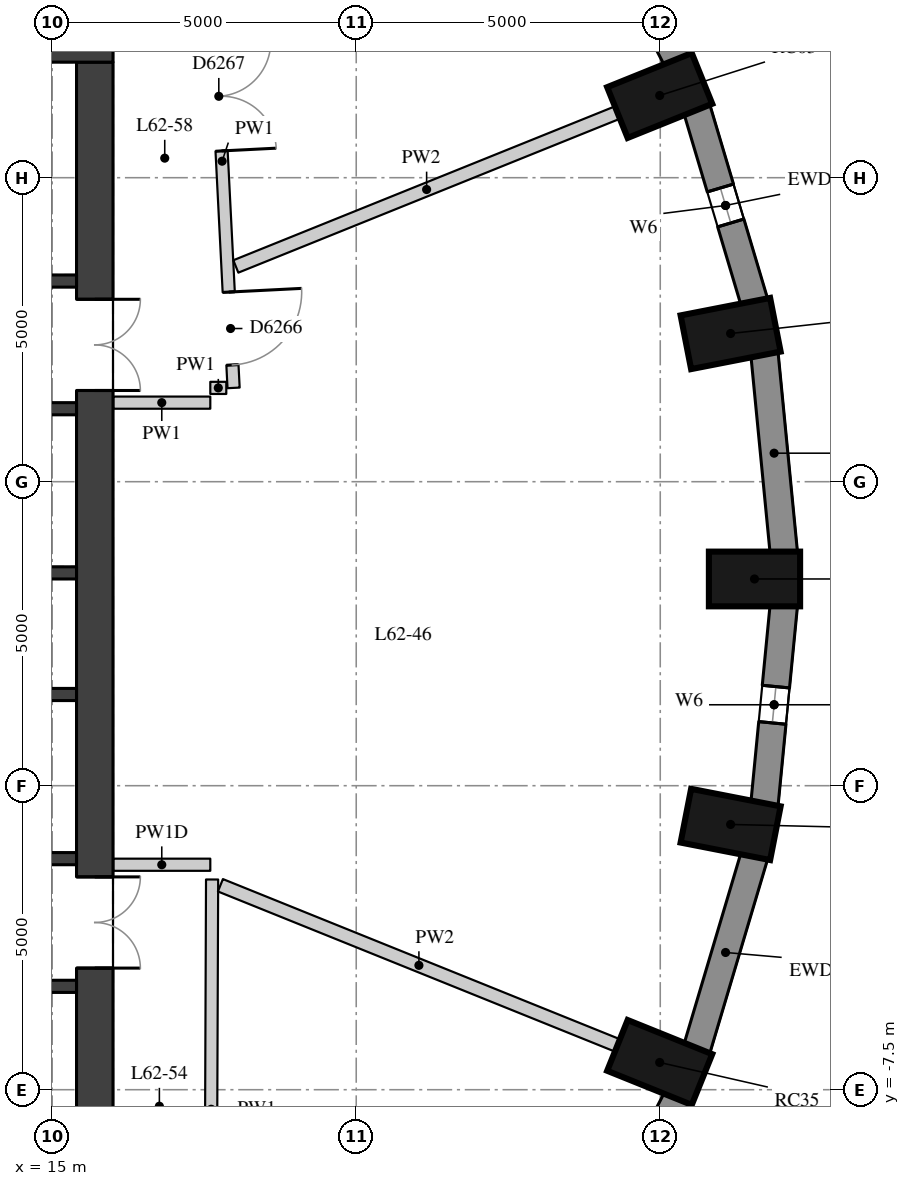
"""IFC4 building model, lengths in metres.
Left out: names, types, materials, properties, quantities, classifications, styles, units other than length and angle.
Written with IfcOpenShell. Run it as: python <this file> out.ifc"""

import sys

from ifc_helpers import new_model, si_unit, direction, frame, frame_2d, origin, origin_2d, place, context, subcontext, project, spatial, rectangle, extrude, element, fill, save


model = new_model("IFC4")
c1 = context("Model", 3, precision=1e-05, world=origin(), true_north=direction((0.0, 1.0)))
c2 = subcontext(c1, "Body", "Model", "MODEL_VIEW")
j1 = project(units=[si_unit("LENGTHUNIT", "METRE"), si_unit("PLANEANGLEUNIT", "RADIAN")], contexts=[c1])
p1 = place(None, origin())
s1 = spatial("IfcSite", under=j1, at=p1, CompositionType="ELEMENT")
p2 = place(p1, origin())
s2 = spatial("IfcBuilding", under=s1, at=p2, CompositionType="ELEMENT")
p3 = place(p2, frame((0.0, 0.0, 218.9)))
s3 = spatial("IfcBuildingStorey", under=s2, at=p3, CompositionType="ELEMENT", Elevation=218.9)
for number, where, z_axis, x_axis in (
    (1, (26.55, 0.9, 0.0), (0.0, 0.0, 1.0), (1.0, 0.0, 0.0)),
    (2, (26.157, 4.937, 0.0), (0.0, 0.0, 1.0), (0.981, 0.192, 0.0)),
    (3, (24.991, 8.852, 0.0), (0.0, 0.0, 1.0), (0.927, 0.374, 0.0)),
    (4, (24.991, -7.052, 0.0), (0.0, 0.0, 1.0), (0.927, -0.374, 0.0)),
    (5, (26.157, -3.137, 0.0), (0.0, 0.0, 1.0), (0.981, -0.192, 0.0)),
):
    element("IfcColumn", number, at=place(p3, frame(where, z_axis=z_axis, x_axis=x_axis)), inside=s3, PredefinedType="COLUMN", context=c2, shape_type="SweptSolid", body=[
        extrude(rectangle(XDim=1.5, YDim=0.9, at=origin_2d()), origin(), (0.0, 0.0, 1.0), 3.3),
    ])
p4 = place(p3, frame((27.032, 1.33, 0.0), z_axis=(0.0, 0.0, 1.0), x_axis=(-0.096824116835, 0.995301507283, 0.0)))
e6 = element("IfcWall", 6, at=p4, inside=s3, PredefinedType="SOLIDWALL", context=c2, shape_type="SweptSolid", body=[
    extrude(rectangle(XDim=3.293, YDim=0.45, at=frame_2d((1.646, 0.0))), origin(), (0.0, 0.0, 1.0), 3.02),
])
p5 = place(p3, frame((26.548, 5.452, 0.0), z_axis=(0.0, 0.0, 1.0), x_axis=(-0.285444972963, 0.958395099847, 0.0)))
e7 = element("IfcWall", 7, at=p5, inside=s3, PredefinedType="SOLIDWALL", context=c2, shape_type="SweptSolid", body=[
    extrude(rectangle(XDim=3.32, YDim=0.45, at=frame_2d((1.66, 0.0))), origin(), (0.0, 0.0, 1.0), 3.02),
])
p6 = place(p5, frame((1.36, 0.0, 0.4)))
e8 = element("IfcOpeningElement", 8, at=p6, cuts=e7, PredefinedType="OPENING", context=c2, shape_type="SweptSolid", body=[
    extrude(rectangle(XDim=0.6, YDim=1.75, at=frame_2d((0.3, 0.875))), frame((0.0, 0.235, 0.0), z_axis=(0.0, -1.0, 0.0), x_axis=(1.0, 0.0, 0.0)), (0.0, 0.0, 1.0), 0.47),
])
p7 = place(p3, frame((25.278, 9.432, 0.0), z_axis=(0.0, 0.0, 1.0), x_axis=(-0.460175500475, 0.887827972505, 0.0)))
e9 = element("IfcWall", 9, at=p7, inside=s3, PredefinedType="SOLIDWALL", context=c2, shape_type="SweptSolid", body=[
    extrude(rectangle(XDim=3.371, YDim=0.45, at=frame_2d((1.685, 0.0))), origin(), (0.0, 0.0, 1.0), 3.02),
])
p8 = place(p3, frame((23.727, -10.624, 0.0), z_axis=(0.0, 0.0, 1.0), x_axis=(0.460175500475, 0.887827972505, 0.0)))
e10 = element("IfcWall", 10, at=p8, inside=s3, PredefinedType="SOLIDWALL", context=c2, shape_type="SweptSolid", body=[
    extrude(rectangle(XDim=3.371, YDim=0.45, at=frame_2d((1.685, 0.0))), origin(), (0.0, 0.0, 1.0), 3.02),
])
p9 = place(p8, frame((1.385, 0.0, 0.4)))
e11 = element("IfcOpeningElement", 11, at=p9, cuts=e10, PredefinedType="OPENING", context=c2, shape_type="SweptSolid", body=[
    extrude(rectangle(XDim=0.6, YDim=1.75, at=frame_2d((0.3, 0.875))), frame((0.0, 0.235, 0.0), z_axis=(0.0, -1.0, 0.0), x_axis=(1.0, 0.0, 0.0)), (0.0, 0.0, 1.0), 0.47),
])
p10 = place(p3, frame((25.6, -6.834, 0.0), z_axis=(0.0, 0.0, 1.0), x_axis=(0.285444972963, 0.958395099847, 0.0)))
e12 = element("IfcWall", 12, at=p10, inside=s3, PredefinedType="SOLIDWALL", context=c2, shape_type="SweptSolid", body=[
    extrude(rectangle(XDim=3.32, YDim=0.45, at=frame_2d((1.66, 0.0))), origin(), (0.0, 0.0, 1.0), 3.02),
])
p11 = place(p3, frame((26.713, -2.808, 0.0), z_axis=(0.0, 0.0, 1.0), x_axis=(0.096816972749, 0.995302202242, 0.0)))
e13 = element("IfcWall", 13, at=p11, inside=s3, PredefinedType="SOLIDWALL", context=c2, shape_type="SweptSolid", body=[
    extrude(rectangle(XDim=3.293, YDim=0.45, at=frame_2d((1.646, 0.0))), origin(), (0.0, 0.0, 1.0), 3.02),
])
p12 = place(p11, frame((1.347, 0.0, 0.4)))
e14 = element("IfcOpeningElement", 14, at=p12, cuts=e13, PredefinedType="OPENING", context=c2, shape_type="SweptSolid", body=[
    extrude(rectangle(XDim=0.6, YDim=1.75, at=frame_2d((0.3, 0.875))), frame((0.0, 0.235, 0.0), z_axis=(0.0, -1.0, 0.0), x_axis=(1.0, 0.0, 0.0)), (0.0, 0.0, 1.0), 0.47),
])
p13 = place(p3, frame((15.7, -9.4, 0.0), z_axis=(0.0, 0.0, 1.0), x_axis=(0.0, 1.0, 0.0)))
e15 = element("IfcWall", 15, at=p13, inside=s3, PredefinedType="SHEAR", context=c2, shape_type="SweptSolid", body=[
    extrude(rectangle(XDim=18.8, YDim=0.6, at=frame_2d((9.4, 0.0))), origin(), (0.0, 0.0, 1.0), 3.02),
])
p14 = place(p13, frame((13.4, 0.0, 0.0)))
e16 = element("IfcOpeningElement", 16, at=p14, cuts=e15, PredefinedType="OPENING", context=c2, shape_type="SweptSolid", body=[
    extrude(rectangle(XDim=1.5, YDim=2.1, at=frame_2d((0.75, 1.05))), frame((0.0, 0.31, 0.0), z_axis=(0.0, -1.0, 0.0), x_axis=(1.0, 0.0, 0.0)), (0.0, 0.0, 1.0), 0.62),
])
p15 = place(p13, frame((3.9, 0.0, 0.0)))
e17 = element("IfcOpeningElement", 17, at=p15, cuts=e15, PredefinedType="OPENING", context=c2, shape_type="SweptSolid", body=[
    extrude(rectangle(XDim=1.5, YDim=2.1, at=frame_2d((0.75, 1.05))), frame((0.0, 0.31, 0.0), z_axis=(0.0, -1.0, 0.0), x_axis=(1.0, 0.0, 0.0)), (0.0, 0.0, 1.0), 0.62),
])
p16 = place(p3, frame((4.0, 9.7, 0.0), z_axis=(0.0, 0.0, 1.0), x_axis=(1.0, 0.0, 0.0)))
e18 = element("IfcWall", 18, at=p16, inside=s3, PredefinedType="SHEAR", context=c2, shape_type="SweptSolid", body=[
    extrude(rectangle(XDim=12.0, YDim=0.6, at=frame_2d((6.0, 0.0))), origin(), (0.0, 0.0, 1.0), 3.02),
])
p17 = place(p3, frame((4.6, 5.8, 0.0), z_axis=(0.0, 0.0, 1.0), x_axis=(1.0, 0.0, 0.0)))
e19 = element("IfcWall", 19, at=p17, inside=s3, PredefinedType="SHEAR", context=c2, shape_type="SweptSolid", body=[
    extrude(rectangle(XDim=10.8, YDim=0.2, at=frame_2d((5.4, 0.0))), origin(), (0.0, 0.0, 1.0), 3.02),
])
p18 = place(p17, frame((7.05, 0.0, 0.0)))
e20 = element("IfcOpeningElement", 20, at=p18, cuts=e19, PredefinedType="OPENING", context=c2, shape_type="SweptSolid", body=[
    extrude(rectangle(XDim=1.1, YDim=2.1, at=frame_2d((0.55, 1.05))), frame((0.0, 0.11, 0.0), z_axis=(0.0, -1.0, 0.0), x_axis=(1.0, 0.0, 0.0)), (0.0, 0.0, 1.0), 0.22),
])
p19 = place(p17, frame((9.05, 0.0, 0.0)))
e21 = element("IfcOpeningElement", 21, at=p19, cuts=e19, PredefinedType="OPENING", context=c2, shape_type="SweptSolid", body=[
    extrude(rectangle(XDim=1.1, YDim=2.1, at=frame_2d((0.55, 1.05))), frame((0.0, 0.11, 0.0), z_axis=(0.0, -1.0, 0.0), x_axis=(1.0, 0.0, 0.0)), (0.0, 0.0, 1.0), 0.22),
])
p20 = place(p3, frame((4.6, 3.7, 0.0), z_axis=(0.0, 0.0, 1.0), x_axis=(1.0, 0.0, 0.0)))
e22 = element("IfcWall", 22, at=p20, inside=s3, PredefinedType="SHEAR", context=c2, shape_type="SweptSolid", body=[
    extrude(rectangle(XDim=10.8, YDim=0.2, at=frame_2d((5.4, 0.0))), origin(), (0.0, 0.0, 1.0), 3.02),
])
p21 = place(p20, frame((6.6, 0.0, 0.0)))
e23 = element("IfcOpeningElement", 23, at=p21, cuts=e22, PredefinedType="OPENING", context=c2, shape_type="SweptSolid", body=[
    extrude(rectangle(XDim=1.1, YDim=2.1, at=frame_2d((0.55, 1.05))), frame((0.0, 0.11, 0.0), z_axis=(0.0, -1.0, 0.0), x_axis=(1.0, 0.0, 0.0)), (0.0, 0.0, 1.0), 0.22),
])
p22 = place(p20, frame((8.9, 0.0, 0.0)))
e24 = element("IfcOpeningElement", 24, at=p22, cuts=e22, PredefinedType="OPENING", context=c2, shape_type="SweptSolid", body=[
    extrude(rectangle(XDim=1.1, YDim=2.1, at=frame_2d((0.55, 1.05))), frame((0.0, 0.11, 0.0), z_axis=(0.0, -1.0, 0.0), x_axis=(1.0, 0.0, 0.0)), (0.0, 0.0, 1.0), 0.22),
])
for number, where, z_axis, x_axis in (
    (25, (4.6, 1.0, 0.0), (0.0, 0.0, 1.0), (1.0, 0.0, 0.0)),
    (26, (4.6, -1.0, 0.0), (0.0, 0.0, 1.0), (1.0, 0.0, 0.0)),
):
    element("IfcWall", number, at=place(p3, frame(where, z_axis=z_axis, x_axis=x_axis)), inside=s3, PredefinedType="SHEAR", context=c2, shape_type="SweptSolid", body=[
        extrude(rectangle(XDim=10.8, YDim=0.2, at=frame_2d((5.4, 0.0))), origin(), (0.0, 0.0, 1.0), 3.02),
    ])
p23 = place(p3, frame((4.6, -3.7, 0.0), z_axis=(0.0, 0.0, 1.0), x_axis=(1.0, 0.0, 0.0)))
e27 = element("IfcWall", 27, at=p23, inside=s3, PredefinedType="SHEAR", context=c2, shape_type="SweptSolid", body=[
    extrude(rectangle(XDim=10.8, YDim=0.2, at=frame_2d((5.4, 0.0))), origin(), (0.0, 0.0, 1.0), 3.02),
])
p24 = place(p23, frame((6.6, 0.0, 0.0)))
e28 = element("IfcOpeningElement", 28, at=p24, cuts=e27, PredefinedType="OPENING", context=c2, shape_type="SweptSolid", body=[
    extrude(rectangle(XDim=1.1, YDim=2.1, at=frame_2d((0.55, 1.05))), frame((0.0, 0.11, 0.0), z_axis=(0.0, -1.0, 0.0), x_axis=(1.0, 0.0, 0.0)), (0.0, 0.0, 1.0), 0.22),
])
p25 = place(p23, frame((8.9, 0.0, 0.0)))
e29 = element("IfcOpeningElement", 29, at=p25, cuts=e27, PredefinedType="OPENING", context=c2, shape_type="SweptSolid", body=[
    extrude(rectangle(XDim=1.1, YDim=2.1, at=frame_2d((0.55, 1.05))), frame((0.0, 0.11, 0.0), z_axis=(0.0, -1.0, 0.0), x_axis=(1.0, 0.0, 0.0)), (0.0, 0.0, 1.0), 0.22),
])
p26 = place(p3, frame((4.6, -5.8, 0.0), z_axis=(0.0, 0.0, 1.0), x_axis=(1.0, 0.0, 0.0)))
e30 = element("IfcWall", 30, at=p26, inside=s3, PredefinedType="SHEAR", context=c2, shape_type="SweptSolid", body=[
    extrude(rectangle(XDim=10.8, YDim=0.2, at=frame_2d((5.4, 0.0))), origin(), (0.0, 0.0, 1.0), 3.02),
])
p27 = place(p3, frame((17.63, -4.043, 0.0), z_axis=(0.0, 0.0, 1.0), x_axis=(-0.003908870153, -0.999992360338, 0.0)))
e31 = element("IfcWall", 31, at=p27, inside=s3, PredefinedType="PARTITIONING", context=c2, shape_type="SweptSolid", body=[
    extrude(rectangle(XDim=7.557, YDim=0.2, at=frame_2d((3.779, 0.0))), origin(), (0.0, 0.0, 1.0), 3.02),
])
p28 = place(p3, frame((17.605, 11.5, 0.0), z_axis=(0.0, 0.0, 1.0), x_axis=(0.050646981223, -0.998716618112, 0.0)))
e32 = element("IfcWall", 32, at=p28, inside=s3, PredefinedType="PARTITIONING", context=c2, shape_type="SweptSolid", body=[
    extrude(rectangle(XDim=7.467, YDim=0.2, at=frame_2d((3.733, 0.0))), origin(), (0.0, 0.0, 1.0), 3.02),
])
p29 = place(p28, frame((5.889, 0.0, 0.0)))
e33 = element("IfcOpeningElement", 33, at=p29, cuts=e32, PredefinedType="OPENING", context=c2, shape_type="SweptSolid", body=[
    extrude(rectangle(XDim=1.2, YDim=2.1, at=frame_2d((0.6, 1.05))), frame((0.0, 0.11, 0.0), z_axis=(0.0, -1.0, 0.0), x_axis=(1.0, 0.0, 0.0)), (0.0, 0.0, 1.0), 0.22),
])
p30 = place(p28, frame((1.765, 0.0, 0.0)))
e34 = element("IfcOpeningElement", 34, at=p30, cuts=e32, PredefinedType="OPENING", context=c2, shape_type="SweptSolid", body=[
    extrude(rectangle(XDim=1.8, YDim=2.1, at=frame_2d((0.9, 1.05))), frame((0.0, 0.11, 0.0), z_axis=(0.0, -1.0, 0.0), x_axis=(1.0, 0.0, 0.0)), (0.0, 0.0, 1.0), 0.22),
])
p31 = place(p3, frame((17.863, 4.043, 0.0), z_axis=(0.0, 0.0, 1.0), x_axis=(-1.0, 0.0, 0.0)))
e35 = element("IfcWall", 35, at=p31, inside=s3, PredefinedType="PARTITIONING", context=c2, shape_type="SweptSolid", body=[
    extrude(rectangle(XDim=0.263, YDim=0.2, at=frame_2d((0.131, 0.0))), origin(), (0.0, 0.0, 1.0), 3.02),
])
p32 = place(p3, frame((17.6, 3.8, 0.0), z_axis=(0.0, 0.0, 1.0), x_axis=(-1.0, 0.0, 0.0)))
e36 = element("IfcWall", 36, at=p32, inside=s3, PredefinedType="PARTITIONING", context=c2, shape_type="SweptSolid", body=[
    extrude(rectangle(XDim=1.596, YDim=0.2, at=frame_2d((0.798, 0.0))), origin(), (0.0, 0.0, 1.0), 3.02),
])
p33 = place(p3, frame((16.004, -3.8, 0.0), z_axis=(0.0, 0.0, 1.0), x_axis=(1.0, 0.0, 0.0)))
e37 = element("IfcWall", 37, at=p33, inside=s3, PredefinedType="PARTITIONING", context=c2, shape_type="SweptSolid", body=[
    extrude(rectangle(XDim=1.596, YDim=0.2, at=frame_2d((0.798, 0.0))), origin(), (0.0, 0.0, 1.0), 2.47),
])
p34 = place(p3, frame((24.295, 8.571, 0.0), z_axis=(0.0, 0.0, 1.0), x_axis=(-0.927397869515, -0.374076451569, 0.0)))
e38 = element("IfcWall", 38, at=p34, inside=s3, PredefinedType="PARTITIONING", context=c2, shape_type="SweptSolid", body=[
    extrude(rectangle(XDim=6.767, YDim=0.22, at=frame_2d((3.383, 0.0))), origin(), (0.0, 0.0, 1.0), 3.02),
])
p35 = place(p3, frame((24.295, -6.771, 0.0), z_axis=(0.0, 0.0, 1.0), x_axis=(-0.927386950843, 0.374103519639, 0.0)))
e39 = element("IfcWall", 39, at=p35, inside=s3, PredefinedType="PARTITIONING", context=c2, shape_type="SweptSolid", body=[
    extrude(rectangle(XDim=7.04, YDim=0.22, at=frame_2d((3.52, 0.0))), origin(), (0.0, 0.0, 1.0), 3.02),
])
p36 = place(p6, origin())
e40 = element("IfcWindow", 40, at=p36, inside=s3, PartitioningType="SINGLE_PANEL", PredefinedType="WINDOW", context=c2, shape_type="SweptSolid", body=[
    extrude(rectangle(XDim=0.6, YDim=1.75, at=frame_2d((0.3, 0.875))), frame((0.0, 0.035, 0.0), z_axis=(0.0, -1.0, 0.0), x_axis=(1.0, 0.0, 0.0)), (0.0, 0.0, 1.0), 0.06),
])
fill(e8, e40)
p37 = place(p12, origin())
e41 = element("IfcWindow", 41, at=p37, inside=s3, PartitioningType="SINGLE_PANEL", PredefinedType="WINDOW", context=c2, shape_type="SweptSolid", body=[
    extrude(rectangle(XDim=0.6, YDim=1.75, at=frame_2d((0.3, 0.875))), frame((0.0, 0.035, 0.0), z_axis=(0.0, -1.0, 0.0), x_axis=(1.0, 0.0, 0.0)), (0.0, 0.0, 1.0), 0.06),
])
fill(e14, e41)
p38 = place(p14, origin())
e42 = element("IfcDoor", 42, at=p38, inside=s3, OperationType="DOUBLE_DOOR_SINGLE_SWING", PredefinedType="DOOR", context=c2, shape_type="SweptSolid", body=[
    extrude(rectangle(XDim=1.5, YDim=2.1, at=frame_2d((0.75, 1.05))), frame((0.0, 0.025, 0.0), z_axis=(0.0, -1.0, 0.0), x_axis=(1.0, 0.0, 0.0)), (0.0, 0.0, 1.0), 0.05),
])
fill(e16, e42)
p39 = place(p15, origin())
e43 = element("IfcDoor", 43, at=p39, inside=s3, OperationType="DOUBLE_DOOR_SINGLE_SWING", PredefinedType="DOOR", context=c2, shape_type="SweptSolid", body=[
    extrude(rectangle(XDim=1.5, YDim=2.1, at=frame_2d((0.75, 1.05))), frame((0.0, 0.025, 0.0), z_axis=(0.0, -1.0, 0.0), x_axis=(1.0, 0.0, 0.0)), (0.0, 0.0, 1.0), 0.05),
])
fill(e17, e43)
p40 = place(p29, origin())
e44 = element("IfcDoor", 44, at=p40, inside=s3, OperationType="SINGLE_SWING_LEFT", PredefinedType="DOOR", context=c2, shape_type="SweptSolid", body=[
    extrude(rectangle(XDim=1.2, YDim=2.1, at=frame_2d((0.6, 1.05))), frame((0.0, 0.025, 0.0), z_axis=(0.0, -1.0, 0.0), x_axis=(1.0, 0.0, 0.0)), (0.0, 0.0, 1.0), 0.05),
])
fill(e33, e44)
p41 = place(p30, origin())
e45 = element("IfcDoor", 45, at=p41, inside=s3, OperationType="DOUBLE_DOOR_SINGLE_SWING", PredefinedType="DOOR", context=c2, shape_type="SweptSolid", body=[
    extrude(rectangle(XDim=1.8, YDim=2.1, at=frame_2d((0.9, 1.05))), frame((0.0, 0.025, 0.0), z_axis=(0.0, -1.0, 0.0), x_axis=(1.0, 0.0, 0.0)), (0.0, 0.0, 1.0), 0.05),
])
fill(e34, e45)
save(model, sys.argv[1])
